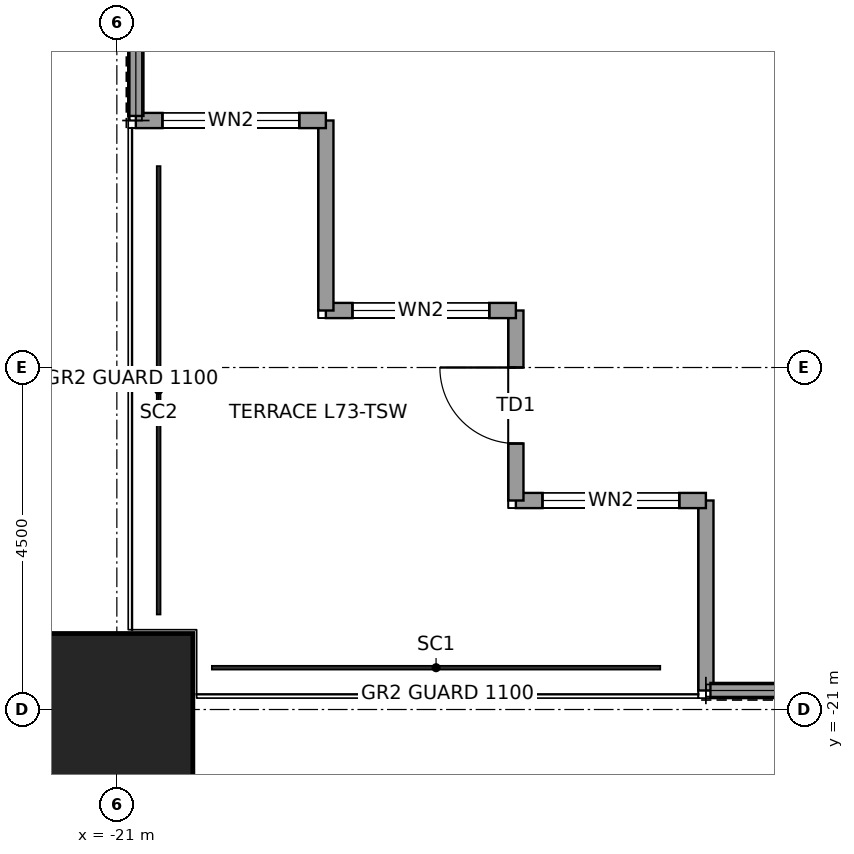
"""IFC4 building model, lengths in metres.
Left out: names, types, materials, properties, quantities, classifications, styles, units other than length and angle.
Written with IfcOpenShell. Run it as: python <this file> out.ifc"""

import sys

from ifc_helpers import new_model, si_unit, direction, frame, frame_2d, origin, origin_2d, place, context, subcontext, project, spatial, rectangle, hollow_rectangle, extrude, element, fill, save


model = new_model("IFC4")
c1 = context("Model", 3, precision=1e-05, world=origin(), true_north=direction((0.0, 1.0)))
c2 = subcontext(c1, "Body", "Model", "MODEL_VIEW")
j1 = project(units=[si_unit("LENGTHUNIT", "METRE"), si_unit("PLANEANGLEUNIT", "RADIAN")], contexts=[c1])
p1 = place(None, origin())
s1 = spatial("IfcSite", under=j1, at=p1, CompositionType="ELEMENT")
p2 = place(p1, origin())
s2 = spatial("IfcBuilding", under=s1, at=p2, CompositionType="ELEMENT")
p3 = place(p2, frame((0.0, 0.0, 327.9)))
s3 = spatial("IfcBuildingStorey", under=s2, at=p3, CompositionType="ELEMENT", Elevation=327.9)
p4 = place(p3, frame((-21.0, -21.0, 0.0), z_axis=(0.0, 0.0, 1.0), x_axis=(1.0, 0.0, 0.0)))
e1 = element("IfcColumn", 1, at=p4, inside=s3, PredefinedType="COLUMN", context=c2, shape_type="SweptSolid", body=[
    extrude(hollow_rectangle(XDim=2.0, YDim=2.0, WallThickness=0.095, at=origin_2d()), origin(), (0.0, 0.0, 1.0), 4.0),
])
p5 = place(p3, frame((-13.25, -20.75, 0.0), z_axis=(0.0, 0.0, 1.0), x_axis=(0.0, 1.0, 0.0)))
e2 = element("IfcWall", 2, at=p5, inside=s3, PredefinedType="SOLIDWALL", context=c2, shape_type="SweptSolid", body=[
    extrude(rectangle(XDim=2.5, YDim=0.2, at=frame_2d((1.25, 0.0))), origin(), (0.0, 0.0, 1.0), 3.85),
])
p6 = place(p3, frame((-13.25, -18.25, 0.0), z_axis=(0.0, 0.0, 1.0), x_axis=(-1.0, 0.0, 0.0)))
e3 = element("IfcWall", 3, at=p6, inside=s3, PredefinedType="SOLIDWALL", context=c2, shape_type="SweptSolid", body=[
    extrude(rectangle(XDim=2.5, YDim=0.2, at=frame_2d((1.25, 0.0))), origin(), (0.0, 0.0, 1.0), 3.85),
])
p7 = place(p6, frame((0.35, 0.0, 0.3)))
e4 = element("IfcOpeningElement", 4, at=p7, cuts=e3, PredefinedType="OPENING", context=c2, shape_type="SweptSolid", body=[
    extrude(rectangle(XDim=1.8, YDim=2.4, at=frame_2d((0.9, 1.2))), frame((0.0, 0.11, 0.0), z_axis=(0.0, -1.0, 0.0), x_axis=(1.0, 0.0, 0.0)), (0.0, 0.0, 1.0), 0.22),
])
p8 = place(p3, frame((-15.75, -18.25, 0.0), z_axis=(0.0, 0.0, 1.0), x_axis=(0.0, 1.0, 0.0)))
e5 = element("IfcWall", 5, at=p8, inside=s3, PredefinedType="SOLIDWALL", context=c2, shape_type="SweptSolid", body=[
    extrude(rectangle(XDim=2.5, YDim=0.2, at=frame_2d((1.25, 0.0))), origin(), (0.0, 0.0, 1.0), 3.317),
])
p9 = place(p8, frame((0.75, 0.0, 0.0)))
e6 = element("IfcOpeningElement", 6, at=p9, cuts=e5, PredefinedType="OPENING", context=c2, shape_type="SweptSolid", body=[
    extrude(rectangle(XDim=1.0, YDim=2.4, at=frame_2d((0.5, 1.2))), frame((0.0, 0.11, 0.0), z_axis=(0.0, -1.0, 0.0), x_axis=(1.0, 0.0, 0.0)), (0.0, 0.0, 1.0), 0.22),
])
p10 = place(p3, frame((-15.75, -15.75, 0.0), z_axis=(0.0, 0.0, 1.0), x_axis=(-1.0, 0.0, 0.0)))
e7 = element("IfcWall", 7, at=p10, inside=s3, PredefinedType="SOLIDWALL", context=c2, shape_type="SweptSolid", body=[
    extrude(rectangle(XDim=2.5, YDim=0.2, at=frame_2d((1.25, 0.0))), origin(), (0.0, 0.0, 1.0), 3.85),
])
p11 = place(p10, frame((0.35, 0.0, 0.3)))
e8 = element("IfcOpeningElement", 8, at=p11, cuts=e7, PredefinedType="OPENING", context=c2, shape_type="SweptSolid", body=[
    extrude(rectangle(XDim=1.8, YDim=2.4, at=frame_2d((0.9, 1.2))), frame((0.0, 0.11, 0.0), z_axis=(0.0, -1.0, 0.0), x_axis=(1.0, 0.0, 0.0)), (0.0, 0.0, 1.0), 0.22),
])
p12 = place(p3, frame((-18.25, -15.75, 0.0), z_axis=(0.0, 0.0, 1.0), x_axis=(0.0, 1.0, 0.0)))
e9 = element("IfcWall", 9, at=p12, inside=s3, PredefinedType="SOLIDWALL", context=c2, shape_type="SweptSolid", body=[
    extrude(rectangle(XDim=2.5, YDim=0.2, at=frame_2d((1.25, 0.0))), origin(), (0.0, 0.0, 1.0), 3.85),
])
p13 = place(p3, frame((-18.25, -13.25, 0.0), z_axis=(0.0, 0.0, 1.0), x_axis=(-1.0, 0.0, 0.0)))
e10 = element("IfcWall", 10, at=p13, inside=s3, PredefinedType="SOLIDWALL", context=c2, shape_type="SweptSolid", body=[
    extrude(rectangle(XDim=2.5, YDim=0.2, at=frame_2d((1.25, 0.0))), origin(), (0.0, 0.0, 1.0), 3.85),
])
p14 = place(p13, frame((0.35, 0.0, 0.3)))
e11 = element("IfcOpeningElement", 11, at=p14, cuts=e10, PredefinedType="OPENING", context=c2, shape_type="SweptSolid", body=[
    extrude(rectangle(XDim=1.8, YDim=2.4, at=frame_2d((0.9, 1.2))), frame((0.0, 0.11, 0.0), z_axis=(0.0, -1.0, 0.0), x_axis=(1.0, 0.0, 0.0)), (0.0, 0.0, 1.0), 0.22),
])
for number, where, z_axis, x_axis in (
    (12, (-10.435, -20.75, 0.0), (0.0, 0.0, 1.0), (-1.0, 0.0, 0.0)),
    (13, (-20.75, -13.19, 0.0), (0.0, 0.0, 1.0), (0.0, 1.0, 0.0)),
):
    element("IfcWall", number, at=place(p3, frame(where, z_axis=z_axis, x_axis=x_axis)), inside=s3, PredefinedType="SOLIDWALL", context=c2, shape_type="SweptSolid", body=[
        extrude(rectangle(XDim=2.755, YDim=0.2, at=frame_2d((1.377, 0.0))), origin(), (0.0, 0.0, 1.0), 3.85),
    ])
p15 = place(p7, origin())
e14 = element("IfcWindow", 14, at=p15, inside=s3, PartitioningType="SINGLE_PANEL", PredefinedType="WINDOW", context=c2, shape_type="SweptSolid", body=[
    extrude(rectangle(XDim=1.8, YDim=2.4, at=frame_2d((0.9, 1.2))), frame((0.0, 0.03, 0.0), z_axis=(0.0, -1.0, 0.0), x_axis=(1.0, 0.0, 0.0)), (0.0, 0.0, 1.0), 0.06),
])
fill(e4, e14)
p16 = place(p9, origin())
e15 = element("IfcDoor", 15, at=p16, inside=s3, OperationType="SINGLE_SWING_RIGHT", PredefinedType="DOOR", context=c2, shape_type="SweptSolid", body=[
    extrude(rectangle(XDim=1.0, YDim=2.4, at=frame_2d((0.5, 1.2))), frame((0.0, 0.025, 0.0), z_axis=(0.0, -1.0, 0.0), x_axis=(1.0, 0.0, 0.0)), (0.0, 0.0, 1.0), 0.05),
])
fill(e6, e15)
p17 = place(p11, origin())
e16 = element("IfcWindow", 16, at=p17, inside=s3, PartitioningType="SINGLE_PANEL", PredefinedType="WINDOW", context=c2, shape_type="SweptSolid", body=[
    extrude(rectangle(XDim=1.8, YDim=2.4, at=frame_2d((0.9, 1.2))), frame((0.0, 0.03, 0.0), z_axis=(0.0, -1.0, 0.0), x_axis=(1.0, 0.0, 0.0)), (0.0, 0.0, 1.0), 0.06),
])
fill(e8, e16)
p18 = place(p14, origin())
e17 = element("IfcWindow", 17, at=p18, inside=s3, PartitioningType="SINGLE_PANEL", PredefinedType="WINDOW", context=c2, shape_type="SweptSolid", body=[
    extrude(rectangle(XDim=1.8, YDim=2.4, at=frame_2d((0.9, 1.2))), frame((0.0, 0.03, 0.0), z_axis=(0.0, -1.0, 0.0), x_axis=(1.0, 0.0, 0.0)), (0.0, 0.0, 1.0), 0.06),
])
fill(e11, e17)
save(model, sys.argv[1])
